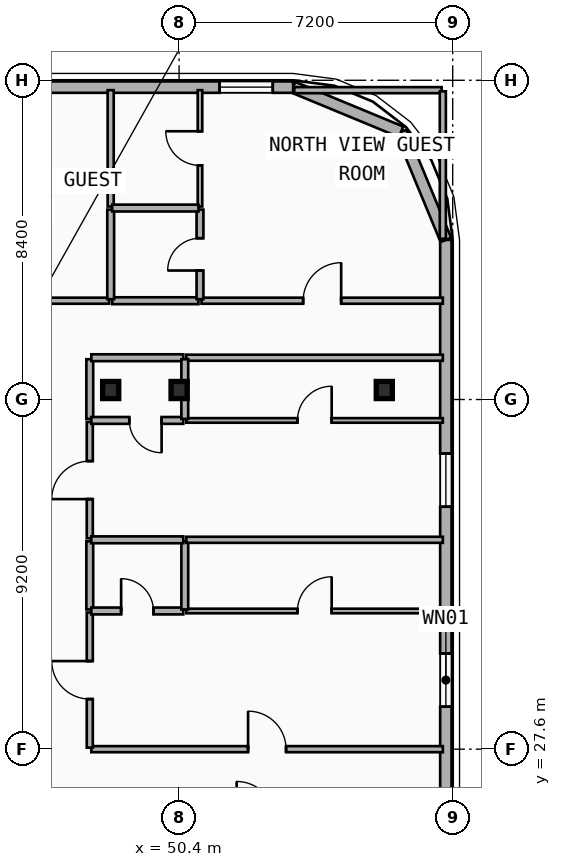
"""IFC4 building model, lengths in metres.
Left out: names, types, materials, properties, quantities, classifications, styles, units other than length and angle.
Written with IfcOpenShell. Run it as: python <this file> out.ifc"""

import sys

from ifc_helpers import new_model, si_unit, direction, frame, frame_2d, origin, origin_2d, place, context, subcontext, project, spatial, rectangle, i_section, extrude, element, fill, save


model = new_model("IFC4")
c1 = context("Model", 3, precision=1e-05, world=origin(), true_north=direction((0.0, 1.0)))
c2 = subcontext(c1, "Body", "Model", "MODEL_VIEW")
j1 = project(units=[si_unit("LENGTHUNIT", "METRE"), si_unit("PLANEANGLEUNIT", "RADIAN")], contexts=[c1])
p1 = place(None, origin())
s1 = spatial("IfcSite", under=j1, at=p1, CompositionType="ELEMENT")
p2 = place(p1, origin())
s2 = spatial("IfcBuilding", under=s1, at=p2, CompositionType="ELEMENT")
p3 = place(p2, frame((0.0, 0.0, 50.0)))
s3 = spatial("IfcBuildingStorey", under=s2, at=p3, CompositionType="ELEMENT", Elevation=50.0)
for number, where, z_axis, x_axis in (
    (1, (48.6, 37.05, 0.0), (0.0, 0.0, 1.0), (1.0, 0.0, 0.0)),
    (2, (50.4, 37.05, 0.0), (0.0, 0.0, 1.0), (1.0, 0.0, 0.0)),
    (3, (55.8, 37.05, 0.0), (0.0, 0.0, 1.0), (1.0, 0.0, 0.0)),
):
    element("IfcColumn", number, at=place(p3, frame(where, z_axis=z_axis, x_axis=x_axis)), inside=s3, PredefinedType="COLUMN", context=c2, shape_type="SweptSolid", body=[
        extrude(i_section(OverallWidth=0.424, OverallDepth=0.45, WebThickness=0.041, FlangeThickness=0.065, FilletRadius=0.015, at=origin_2d()), origin(), (0.0, 0.0, 1.0), 3.5),
    ])
p4 = place(p3, frame((57.42, 41.0, 0.0), z_axis=(0.0, 0.0, 1.0), x_axis=(0.0, -1.0, 0.0)))
e4 = element("IfcWall", 4, at=p4, inside=s3, PredefinedType="SOLIDWALL", context=c2, shape_type="SweptSolid", body=[
    extrude(rectangle(XDim=15.2, YDim=0.3, at=frame_2d((7.6, 0.0))), origin(), (0.0, 0.0, 1.0), 3.24),
])
p5 = place(p4, frame((10.882, 0.0, 0.48)))
e5 = element("IfcOpeningElement", 5, at=p5, cuts=e4, PredefinedType="OPENING", context=c2, shape_type="SweptSolid", body=[
    extrude(rectangle(XDim=1.4, YDim=1.8, at=frame_2d((0.7, 0.9))), frame((0.0, 0.16, 0.0), z_axis=(0.0, -1.0, 0.0), x_axis=(1.0, 0.0, 0.0)), (0.0, 0.0, 1.0), 0.32),
])
p6 = place(p4, frame((5.621, 0.0, 0.48)))
e6 = element("IfcOpeningElement", 6, at=p6, cuts=e4, PredefinedType="OPENING", context=c2, shape_type="SweptSolid", body=[
    extrude(rectangle(XDim=1.4, YDim=1.8, at=frame_2d((0.7, 0.9))), frame((0.0, 0.16, 0.0), z_axis=(0.0, -1.0, 0.0), x_axis=(1.0, 0.0, 0.0)), (0.0, 0.0, 1.0), 0.32),
])
p7 = place(p3, frame((56.243, 43.843, 0.0), z_axis=(0.0, 0.0, 1.0), x_axis=(0.382636798336, -0.92389884758, 0.0)))
e7 = element("IfcWall", 7, at=p7, inside=s3, PredefinedType="SOLIDWALL", context=c2, shape_type="SweptSolid", body=[
    extrude(rectangle(XDim=3.077, YDim=0.3, at=frame_2d((1.538, 0.0))), origin(), (0.0, 0.0, 1.0), 3.24),
])
p8 = place(p3, frame((53.4, 45.02, 0.0), z_axis=(0.0, 0.0, 1.0), x_axis=(0.923882414032, -0.382676475685, 0.0)))
e8 = element("IfcWall", 8, at=p8, inside=s3, PredefinedType="SOLIDWALL", context=c2, shape_type="SweptSolid", body=[
    extrude(rectangle(XDim=3.077, YDim=0.3, at=frame_2d((1.539, 0.0))), origin(), (0.0, 0.0, 1.0), 3.24),
])
p9 = place(p3, frame((4.2, 45.02, 0.0), z_axis=(0.0, 0.0, 1.0), x_axis=(1.0, 0.0, 0.0)))
e9 = element("IfcWall", 9, at=p9, inside=s3, PredefinedType="SOLIDWALL", context=c2, shape_type="SweptSolid", body=[
    extrude(rectangle(XDim=49.2, YDim=0.3, at=frame_2d((24.6, 0.0))), origin(), (0.0, 0.0, 1.0), 3.24),
])
p10 = place(p9, frame((8.99, 0.0, 0.85)))
e10 = element("IfcOpeningElement", 10, at=p10, cuts=e9, PredefinedType="OPENING", context=c2, shape_type="SweptSolid", body=[
    extrude(rectangle(XDim=1.4, YDim=1.8, at=frame_2d((0.7, 0.9))), frame((0.0, 0.16, 0.0), z_axis=(0.0, -1.0, 0.0), x_axis=(1.0, 0.0, 0.0)), (0.0, 0.0, 1.0), 0.32),
])
p11 = place(p9, frame((11.72, 0.0, 0.85)))
e11 = element("IfcOpeningElement", 11, at=p11, cuts=e9, PredefinedType="OPENING", context=c2, shape_type="SweptSolid", body=[
    extrude(rectangle(XDim=1.4, YDim=1.8, at=frame_2d((0.7, 0.9))), frame((0.0, 0.16, 0.0), z_axis=(0.0, -1.0, 0.0), x_axis=(1.0, 0.0, 0.0)), (0.0, 0.0, 1.0), 0.32),
])
p12 = place(p9, frame((19.499, 0.0, 0.85)))
e12 = element("IfcOpeningElement", 12, at=p12, cuts=e9, PredefinedType="OPENING", context=c2, shape_type="SweptSolid", body=[
    extrude(rectangle(XDim=1.4, YDim=1.8, at=frame_2d((0.7, 0.9))), frame((0.0, 0.16, 0.0), z_axis=(0.0, -1.0, 0.0), x_axis=(1.0, 0.0, 0.0)), (0.0, 0.0, 1.0), 0.32),
])
p13 = place(p9, frame((22.998, 0.0, 0.85)))
e13 = element("IfcOpeningElement", 13, at=p13, cuts=e9, PredefinedType="OPENING", context=c2, shape_type="SweptSolid", body=[
    extrude(rectangle(XDim=1.4, YDim=1.8, at=frame_2d((0.7, 0.9))), frame((0.0, 0.16, 0.0), z_axis=(0.0, -1.0, 0.0), x_axis=(1.0, 0.0, 0.0)), (0.0, 0.0, 1.0), 0.32),
])
p14 = place(p9, frame((34.965, 0.0, 0.85)))
e14 = element("IfcOpeningElement", 14, at=p14, cuts=e9, PredefinedType="OPENING", context=c2, shape_type="SweptSolid", body=[
    extrude(rectangle(XDim=1.4, YDim=1.8, at=frame_2d((0.7, 0.9))), frame((0.0, 0.16, 0.0), z_axis=(0.0, -1.0, 0.0), x_axis=(1.0, 0.0, 0.0)), (0.0, 0.0, 1.0), 0.32),
])
p15 = place(p9, frame((39.532, 0.0, 0.85)))
e15 = element("IfcOpeningElement", 15, at=p15, cuts=e9, PredefinedType="OPENING", context=c2, shape_type="SweptSolid", body=[
    extrude(rectangle(XDim=1.4, YDim=1.8, at=frame_2d((0.7, 0.9))), frame((0.0, 0.16, 0.0), z_axis=(0.0, -1.0, 0.0), x_axis=(1.0, 0.0, 0.0)), (0.0, 0.0, 1.0), 0.32),
])
p16 = place(p9, frame((47.265, 0.0, 0.85)))
e16 = element("IfcOpeningElement", 16, at=p16, cuts=e9, PredefinedType="OPENING", context=c2, shape_type="SweptSolid", body=[
    extrude(rectangle(XDim=1.4, YDim=1.8, at=frame_2d((0.7, 0.9))), frame((0.0, 0.16, 0.0), z_axis=(0.0, -1.0, 0.0), x_axis=(1.0, 0.0, 0.0)), (0.0, 0.0, 1.0), 0.32),
])
p17 = place(p3, frame((48.09, 27.6, 0.0), z_axis=(0.0, 0.0, 1.0), x_axis=(1.0, 0.0, 0.0)))
e17 = element("IfcWall", 17, at=p17, inside=s3, PredefinedType="PARTITIONING", context=c2, shape_type="SweptSolid", body=[
    extrude(rectangle(XDim=9.25, YDim=0.16, at=frame_2d((4.625, 0.0))), origin(), (0.0, 0.0, 1.0), 2.57),
])
p18 = place(p17, frame((4.125, 0.0, 0.0)))
e18 = element("IfcOpeningElement", 18, at=p18, cuts=e17, PredefinedType="OPENING", context=c2, shape_type="SweptSolid", body=[
    extrude(rectangle(XDim=1.0, YDim=2.15, at=frame_2d((0.5, 1.075))), frame((0.0, 0.09, 0.0), z_axis=(0.0, -1.0, 0.0), x_axis=(1.0, 0.0, 0.0)), (0.0, 0.0, 1.0), 0.18),
])
p19 = place(p3, frame((48.05, 27.64, 0.0), z_axis=(0.0, 0.0, 1.0), x_axis=(0.0, 1.0, 0.0)))
e19 = element("IfcWall", 19, at=p19, inside=s3, PredefinedType="PARTITIONING", context=c2, shape_type="SweptSolid", body=[
    extrude(rectangle(XDim=3.556, YDim=0.16, at=frame_2d((1.778, 0.0))), origin(), (0.0, 0.0, 1.0), 3.24),
])
p20 = place(p19, frame((1.278, 0.0, 0.0)))
e20 = element("IfcOpeningElement", 20, at=p20, cuts=e19, PredefinedType="OPENING", context=c2, shape_type="SweptSolid", body=[
    extrude(rectangle(XDim=1.0, YDim=2.15, at=frame_2d((0.5, 1.075))), frame((0.0, 0.09, 0.0), z_axis=(0.0, -1.0, 0.0), x_axis=(1.0, 0.0, 0.0)), (0.0, 0.0, 1.0), 0.18),
])
p21 = place(p3, frame((48.05, 31.276, 0.0), z_axis=(0.0, 0.0, 1.0), x_axis=(0.0, 1.0, 0.0)))
e21 = element("IfcWall", 21, at=p21, inside=s3, PredefinedType="PLUMBINGWALL", context=c2, shape_type="SweptSolid", body=[
    extrude(rectangle(XDim=1.793, YDim=0.18, at=frame_2d((0.896, 0.0))), origin(), (0.0, 0.0, 1.0), 3.24),
])
p22 = place(p3, frame((48.05, 33.149, 0.0), z_axis=(0.0, 0.0, 1.0), x_axis=(0.0, 1.0, 0.0)))
e22 = element("IfcWall", 22, at=p22, inside=s3, PredefinedType="PARTITIONING", context=c2, shape_type="SweptSolid", body=[
    extrude(rectangle(XDim=3.061, YDim=0.16, at=frame_2d((1.531, 0.0))), origin(), (0.0, 0.0, 1.0), 3.24),
])
p23 = place(p22, frame((1.031, 0.0, 0.0)))
e23 = element("IfcOpeningElement", 23, at=p23, cuts=e22, PredefinedType="OPENING", context=c2, shape_type="SweptSolid", body=[
    extrude(rectangle(XDim=1.0, YDim=2.15, at=frame_2d((0.5, 1.075))), frame((0.0, 0.09, 0.0), z_axis=(0.0, -1.0, 0.0), x_axis=(1.0, 0.0, 0.0)), (0.0, 0.0, 1.0), 0.18),
])
p24 = place(p3, frame((48.05, 36.29, 0.0), z_axis=(0.0, 0.0, 1.0), x_axis=(0.0, 1.0, 0.0)))
e24 = element("IfcWall", 24, at=p24, inside=s3, PredefinedType="PLUMBINGWALL", context=c2, shape_type="SweptSolid", body=[
    extrude(rectangle(XDim=1.57, YDim=0.18, at=frame_2d((0.785, 0.0))), origin(), (0.0, 0.0, 1.0), 2.72),
])
p25 = place(p3, frame((48.09, 37.9, 0.0), z_axis=(0.0, 0.0, 1.0), x_axis=(1.0, 0.0, 0.0)))
e25 = element("IfcWall", 25, at=p25, inside=s3, PredefinedType="PLUMBINGWALL", context=c2, shape_type="SweptSolid", body=[
    extrude(rectangle(XDim=2.42, YDim=0.18, at=frame_2d((1.21, 0.0))), origin(), (0.0, 0.0, 1.0), 3.24),
])
p26 = place(p3, frame((50.59, 37.9, 0.0), z_axis=(0.0, 0.0, 1.0), x_axis=(1.0, 0.0, 0.0)))
e26 = element("IfcWall", 26, at=p26, inside=s3, PredefinedType="PARTITIONING", context=c2, shape_type="SweptSolid", body=[
    extrude(rectangle(XDim=6.75, YDim=0.16, at=frame_2d((3.375, 0.0))), origin(), (0.0, 0.0, 1.0), 3.24),
])
p27 = place(p3, frame((35.737, 39.4, 0.0), z_axis=(0.0, 0.0, 1.0), x_axis=(1.0, 0.0, 0.0)))
e27 = element("IfcWall", 27, at=p27, inside=s3, PredefinedType="PARTITIONING", context=c2, shape_type="SweptSolid", body=[
    extrude(rectangle(XDim=12.823, YDim=0.16, at=frame_2d((6.412, 0.0))), origin(), (0.0, 0.0, 1.0), 3.24),
])
p28 = place(p27, frame((5.912, 0.0, 0.0)))
e28 = element("IfcOpeningElement", 28, at=p28, cuts=e27, PredefinedType="OPENING", context=c2, shape_type="SweptSolid", body=[
    extrude(rectangle(XDim=1.0, YDim=2.15, at=frame_2d((0.5, 1.075))), frame((0.0, 0.09, 0.0), z_axis=(0.0, -1.0, 0.0), x_axis=(1.0, 0.0, 0.0)), (0.0, 0.0, 1.0), 0.18),
])
p29 = place(p3, frame((50.99, 39.4, 0.0), z_axis=(0.0, 0.0, 1.0), x_axis=(1.0, 0.0, 0.0)))
e29 = element("IfcWall", 29, at=p29, inside=s3, PredefinedType="PARTITIONING", context=c2, shape_type="SweptSolid", body=[
    extrude(rectangle(XDim=6.35, YDim=0.16, at=frame_2d((3.175, 0.0))), origin(), (0.0, 0.0, 1.0), 3.24),
])
p30 = place(p29, frame((2.675, 0.0, 0.0)))
e30 = element("IfcOpeningElement", 30, at=p30, cuts=e29, PredefinedType="OPENING", context=c2, shape_type="SweptSolid", body=[
    extrude(rectangle(XDim=1.0, YDim=2.15, at=frame_2d((0.5, 1.075))), frame((0.0, 0.09, 0.0), z_axis=(0.0, -1.0, 0.0), x_axis=(1.0, 0.0, 0.0)), (0.0, 0.0, 1.0), 0.18),
])
p31 = place(p3, frame((48.64, 39.4, 0.0), z_axis=(0.0, 0.0, 1.0), x_axis=(1.0, 0.0, 0.0)))
e31 = element("IfcWall", 31, at=p31, inside=s3, PredefinedType="PLUMBINGWALL", context=c2, shape_type="SweptSolid", body=[
    extrude(rectangle(XDim=2.27, YDim=0.18, at=frame_2d((1.135, 0.0))), origin(), (0.0, 0.0, 1.0), 3.24),
])
p32 = place(p3, frame((48.09, 31.236, 0.0), z_axis=(0.0, 0.0, 1.0), x_axis=(1.0, 0.0, 0.0)))
e32 = element("IfcWall", 32, at=p32, inside=s3, PredefinedType="PLUMBINGWALL", context=c2, shape_type="SweptSolid", body=[
    extrude(rectangle(XDim=2.42, YDim=0.18, at=frame_2d((1.21, 0.0))), origin(), (0.0, 0.0, 1.0), 2.57),
])
p33 = place(p32, frame((0.785, 0.0, 0.0)))
e33 = element("IfcOpeningElement", 33, at=p33, cuts=e32, PredefinedType="OPENING", context=c2, shape_type="SweptSolid", body=[
    extrude(rectangle(XDim=0.85, YDim=2.1, at=frame_2d((0.425, 1.05))), frame((0.0, 0.1, 0.0), z_axis=(0.0, -1.0, 0.0), x_axis=(1.0, 0.0, 0.0)), (0.0, 0.0, 1.0), 0.2),
])
p34 = place(p3, frame((50.59, 31.236, 0.0), z_axis=(0.0, 0.0, 1.0), x_axis=(1.0, 0.0, 0.0)))
e34 = element("IfcWall", 34, at=p34, inside=s3, PredefinedType="PARTITIONING", context=c2, shape_type="SweptSolid", body=[
    extrude(rectangle(XDim=6.75, YDim=0.12, at=frame_2d((3.375, 0.0))), origin(), (0.0, 0.0, 1.0), 2.57),
])
p35 = place(p34, frame((2.925, 0.0, 0.0)))
e35 = element("IfcOpeningElement", 35, at=p35, cuts=e34, PredefinedType="OPENING", context=c2, shape_type="SweptSolid", body=[
    extrude(rectangle(XDim=0.9, YDim=2.1, at=frame_2d((0.45, 1.05))), frame((0.0, 0.07, 0.0), z_axis=(0.0, -1.0, 0.0), x_axis=(1.0, 0.0, 0.0)), (0.0, 0.0, 1.0), 0.14),
])
p36 = place(p3, frame((50.55, 31.276, 0.0), z_axis=(0.0, 0.0, 1.0), x_axis=(0.0, 1.0, 0.0)))
e36 = element("IfcWall", 36, at=p36, inside=s3, PredefinedType="PLUMBINGWALL", context=c2, shape_type="SweptSolid", body=[
    extrude(rectangle(XDim=1.793, YDim=0.18, at=frame_2d((0.896, 0.0))), origin(), (0.0, 0.0, 1.0), 2.57),
])
p37 = place(p3, frame((48.09, 33.109, 0.0), z_axis=(0.0, 0.0, 1.0), x_axis=(1.0, 0.0, 0.0)))
e37 = element("IfcWall", 37, at=p37, inside=s3, PredefinedType="PLUMBINGWALL", context=c2, shape_type="SweptSolid", body=[
    extrude(rectangle(XDim=2.42, YDim=0.18, at=frame_2d((1.21, 0.0))), origin(), (0.0, 0.0, 1.0), 2.57),
])
p38 = place(p3, frame((50.59, 33.109, 0.0), z_axis=(0.0, 0.0, 1.0), x_axis=(1.0, 0.0, 0.0)))
e38 = element("IfcWall", 38, at=p38, inside=s3, PredefinedType="PARTITIONING", context=c2, shape_type="SweptSolid", body=[
    extrude(rectangle(XDim=6.75, YDim=0.16, at=frame_2d((3.375, 0.0))), origin(), (0.0, 0.0, 1.0), 2.57),
])
p39 = place(p3, frame((50.51, 36.25, 0.0), z_axis=(0.0, 0.0, 1.0), x_axis=(-1.0, 0.0, 0.0)))
e39 = element("IfcWall", 39, at=p39, inside=s3, PredefinedType="PLUMBINGWALL", context=c2, shape_type="SweptSolid", body=[
    extrude(rectangle(XDim=2.42, YDim=0.18, at=frame_2d((1.21, 0.0))), origin(), (0.0, 0.0, 1.0), 2.57),
])
p40 = place(p39, frame((0.57, 0.0, 0.0)))
e40 = element("IfcOpeningElement", 40, at=p40, cuts=e39, PredefinedType="OPENING", context=c2, shape_type="SweptSolid", body=[
    extrude(rectangle(XDim=0.85, YDim=2.1, at=frame_2d((0.425, 1.05))), frame((0.0, 0.1, 0.0), z_axis=(0.0, -1.0, 0.0), x_axis=(1.0, 0.0, 0.0)), (0.0, 0.0, 1.0), 0.2),
])
p41 = place(p3, frame((50.59, 36.25, 0.0), z_axis=(0.0, 0.0, 1.0), x_axis=(1.0, 0.0, 0.0)))
e41 = element("IfcWall", 41, at=p41, inside=s3, PredefinedType="PARTITIONING", context=c2, shape_type="SweptSolid", body=[
    extrude(rectangle(XDim=6.75, YDim=0.12, at=frame_2d((3.375, 0.0))), origin(), (0.0, 0.0, 1.0), 2.57),
])
p42 = place(p41, frame((2.925, 0.0, 0.0)))
e42 = element("IfcOpeningElement", 42, at=p42, cuts=e41, PredefinedType="OPENING", context=c2, shape_type="SweptSolid", body=[
    extrude(rectangle(XDim=0.9, YDim=2.1, at=frame_2d((0.45, 1.05))), frame((0.0, 0.07, 0.0), z_axis=(0.0, -1.0, 0.0), x_axis=(1.0, 0.0, 0.0)), (0.0, 0.0, 1.0), 0.14),
])
p43 = place(p3, frame((50.55, 36.29, 0.0), z_axis=(0.0, 0.0, 1.0), x_axis=(0.0, 1.0, 0.0)))
e43 = element("IfcWall", 43, at=p43, inside=s3, PredefinedType="PLUMBINGWALL", context=c2, shape_type="SweptSolid", body=[
    extrude(rectangle(XDim=1.57, YDim=0.18, at=frame_2d((0.785, 0.0))), origin(), (0.0, 0.0, 1.0), 2.57),
])
p44 = place(p3, frame((48.6, 39.44, 0.0), z_axis=(0.0, 0.0, 1.0), x_axis=(0.0, 1.0, 0.0)))
e44 = element("IfcWall", 44, at=p44, inside=s3, PredefinedType="PLUMBINGWALL", context=c2, shape_type="SweptSolid", body=[
    extrude(rectangle(XDim=2.358, YDim=0.18, at=frame_2d((1.179, 0.0))), origin(), (0.0, 0.0, 1.0), 3.24),
])
p45 = place(p3, frame((48.6, 41.878, 0.0), z_axis=(0.0, 0.0, 1.0), x_axis=(0.0, 1.0, 0.0)))
e45 = element("IfcWall", 45, at=p45, inside=s3, PredefinedType="PARTITIONING", context=c2, shape_type="SweptSolid", body=[
    extrude(rectangle(XDim=3.062, YDim=0.16, at=frame_2d((1.531, 0.0))), origin(), (0.0, 0.0, 1.0), 3.24),
])
p46 = place(p3, frame((50.95, 39.44, 0.0), z_axis=(0.0, 0.0, 1.0), x_axis=(0.0, 1.0, 0.0)))
e46 = element("IfcWall", 46, at=p46, inside=s3, PredefinedType="PLUMBINGWALL", context=c2, shape_type="SweptSolid", body=[
    extrude(rectangle(XDim=2.358, YDim=0.18, at=frame_2d((1.179, 0.0))), origin(), (0.0, 0.0, 1.0), 3.24),
])
p47 = place(p46, frame((0.754, 0.0, 0.0)))
e47 = element("IfcOpeningElement", 47, at=p47, cuts=e46, PredefinedType="OPENING", context=c2, shape_type="SweptSolid", body=[
    extrude(rectangle(XDim=0.85, YDim=2.1, at=frame_2d((0.425, 1.05))), frame((0.0, 0.1, 0.0), z_axis=(0.0, -1.0, 0.0), x_axis=(1.0, 0.0, 0.0)), (0.0, 0.0, 1.0), 0.2),
])
p48 = place(p3, frame((50.95, 41.878, 0.0), z_axis=(0.0, 0.0, 1.0), x_axis=(0.0, 1.0, 0.0)))
e48 = element("IfcWall", 48, at=p48, inside=s3, PredefinedType="PARTITIONING", context=c2, shape_type="SweptSolid", body=[
    extrude(rectangle(XDim=3.062, YDim=0.12, at=frame_2d((1.531, 0.0))), origin(), (0.0, 0.0, 1.0), 3.24),
])
p49 = place(p48, frame((1.081, 0.0, 0.0)))
e49 = element("IfcOpeningElement", 49, at=p49, cuts=e48, PredefinedType="OPENING", context=c2, shape_type="SweptSolid", body=[
    extrude(rectangle(XDim=0.9, YDim=2.1, at=frame_2d((0.45, 1.05))), frame((0.0, 0.07, 0.0), z_axis=(0.0, -1.0, 0.0), x_axis=(1.0, 0.0, 0.0)), (0.0, 0.0, 1.0), 0.14),
])
p50 = place(p3, frame((48.64, 41.838, 0.0), z_axis=(0.0, 0.0, 1.0), x_axis=(1.0, 0.0, 0.0)))
e50 = element("IfcWall", 50, at=p50, inside=s3, PredefinedType="PLUMBINGWALL", context=c2, shape_type="SweptSolid", body=[
    extrude(rectangle(XDim=2.27, YDim=0.18, at=frame_2d((1.135, 0.0))), origin(), (0.0, 0.0, 1.0), 3.24),
])
p51 = place(p3, frame((53.43, 44.94, 0.0), z_axis=(0.0, 0.0, 1.0), x_axis=(1.0, 0.0, 0.0)))
e51 = element("IfcWall", 51, at=p51, inside=s3, PredefinedType="PARTITIONING", context=c2, shape_type="SweptSolid", body=[
    extrude(rectangle(XDim=3.88, YDim=0.16, at=frame_2d((1.94, 0.0))), origin(), (0.0, 0.0, 1.0), 3.24),
])
p52 = place(p3, frame((57.34, 41.03, 0.0), z_axis=(0.0, 0.0, 1.0), x_axis=(0.0, 1.0, 0.0)))
e52 = element("IfcWall", 52, at=p52, inside=s3, PredefinedType="PARTITIONING", context=c2, shape_type="SweptSolid", body=[
    extrude(rectangle(XDim=3.88, YDim=0.16, at=frame_2d((1.94, 0.0))), origin(), (0.0, 0.0, 1.0), 3.24),
])
p53 = place(p5, origin())
e53 = element("IfcWindow", 53, at=p53, inside=s3, PartitioningType="SINGLE_PANEL", PredefinedType="WINDOW", context=c2, shape_type="SweptSolid", body=[
    extrude(rectangle(XDim=1.4, YDim=1.8, at=frame_2d((0.7, 0.9))), frame((0.0, 0.03, 0.0), z_axis=(0.0, -1.0, 0.0), x_axis=(1.0, 0.0, 0.0)), (0.0, 0.0, 1.0), 0.06),
])
fill(e5, e53)
p54 = place(p6, origin())
e54 = element("IfcWindow", 54, at=p54, inside=s3, PartitioningType="SINGLE_PANEL", PredefinedType="WINDOW", context=c2, shape_type="SweptSolid", body=[
    extrude(rectangle(XDim=1.4, YDim=1.8, at=frame_2d((0.7, 0.9))), frame((0.0, 0.03, 0.0), z_axis=(0.0, -1.0, 0.0), x_axis=(1.0, 0.0, 0.0)), (0.0, 0.0, 1.0), 0.06),
])
fill(e6, e54)
p55 = place(p16, origin())
e55 = element("IfcWindow", 55, at=p55, inside=s3, PartitioningType="SINGLE_PANEL", PredefinedType="WINDOW", context=c2, shape_type="SweptSolid", body=[
    extrude(rectangle(XDim=1.4, YDim=1.8, at=frame_2d((0.7, 0.9))), frame((0.0, 0.03, 0.0), z_axis=(0.0, -1.0, 0.0), x_axis=(1.0, 0.0, 0.0)), (0.0, 0.0, 1.0), 0.06),
])
fill(e16, e55)
p56 = place(p18, origin())
e56 = element("IfcDoor", 56, at=p56, inside=s3, OperationType="SINGLE_SWING_LEFT", PredefinedType="DOOR", context=c2, shape_type="SweptSolid", body=[
    extrude(rectangle(XDim=1.0, YDim=2.15, at=frame_2d((0.5, 1.075))), frame((0.0, 0.025, 0.0), z_axis=(0.0, -1.0, 0.0), x_axis=(1.0, 0.0, 0.0)), (0.0, 0.0, 1.0), 0.05),
])
fill(e18, e56)
p57 = place(p20, origin())
e57 = element("IfcDoor", 57, at=p57, inside=s3, OperationType="SINGLE_SWING_RIGHT", PredefinedType="DOOR", context=c2, shape_type="SweptSolid", body=[
    extrude(rectangle(XDim=1.0, YDim=2.15, at=frame_2d((0.5, 1.075))), frame((0.0, 0.025, 0.0), z_axis=(0.0, -1.0, 0.0), x_axis=(1.0, 0.0, 0.0)), (0.0, 0.0, 1.0), 0.05),
])
fill(e20, e57)
p58 = place(p23, origin())
e58 = element("IfcDoor", 58, at=p58, inside=s3, OperationType="SINGLE_SWING_LEFT", PredefinedType="DOOR", context=c2, shape_type="SweptSolid", body=[
    extrude(rectangle(XDim=1.0, YDim=2.15, at=frame_2d((0.5, 1.075))), frame((0.0, 0.025, 0.0), z_axis=(0.0, -1.0, 0.0), x_axis=(1.0, 0.0, 0.0)), (0.0, 0.0, 1.0), 0.05),
])
fill(e23, e58)
p59 = place(p30, origin())
e59 = element("IfcDoor", 59, at=p59, inside=s3, OperationType="SINGLE_SWING_RIGHT", PredefinedType="DOOR", context=c2, shape_type="SweptSolid", body=[
    extrude(rectangle(XDim=1.0, YDim=2.15, at=frame_2d((0.5, 1.075))), frame((0.0, 0.025, 0.0), z_axis=(0.0, -1.0, 0.0), x_axis=(1.0, 0.0, 0.0)), (0.0, 0.0, 1.0), 0.05),
])
fill(e30, e59)
p60 = place(p33, origin())
e60 = element("IfcDoor", 60, at=p60, inside=s3, OperationType="SINGLE_SWING_LEFT", PredefinedType="DOOR", context=c2, shape_type="SweptSolid", body=[
    extrude(rectangle(XDim=0.85, YDim=2.1, at=frame_2d((0.425, 1.05))), frame((0.0, 0.025, 0.0), z_axis=(0.0, -1.0, 0.0), x_axis=(1.0, 0.0, 0.0)), (0.0, 0.0, 1.0), 0.05),
])
fill(e33, e60)
p61 = place(p35, origin())
e61 = element("IfcDoor", 61, at=p61, inside=s3, OperationType="SINGLE_SWING_RIGHT", PredefinedType="DOOR", context=c2, shape_type="SweptSolid", body=[
    extrude(rectangle(XDim=0.9, YDim=2.1, at=frame_2d((0.45, 1.05))), frame((0.0, 0.025, 0.0), z_axis=(0.0, -1.0, 0.0), x_axis=(1.0, 0.0, 0.0)), (0.0, 0.0, 1.0), 0.05),
])
fill(e35, e61)
p62 = place(p40, origin())
e62 = element("IfcDoor", 62, at=p62, inside=s3, OperationType="SINGLE_SWING_LEFT", PredefinedType="DOOR", context=c2, shape_type="SweptSolid", body=[
    extrude(rectangle(XDim=0.85, YDim=2.1, at=frame_2d((0.425, 1.05))), frame((0.0, 0.025, 0.0), z_axis=(0.0, -1.0, 0.0), x_axis=(1.0, 0.0, 0.0)), (0.0, 0.0, 1.0), 0.05),
])
fill(e40, e62)
p63 = place(p42, origin())
e63 = element("IfcDoor", 63, at=p63, inside=s3, OperationType="SINGLE_SWING_RIGHT", PredefinedType="DOOR", context=c2, shape_type="SweptSolid", body=[
    extrude(rectangle(XDim=0.9, YDim=2.1, at=frame_2d((0.45, 1.05))), frame((0.0, 0.025, 0.0), z_axis=(0.0, -1.0, 0.0), x_axis=(1.0, 0.0, 0.0)), (0.0, 0.0, 1.0), 0.05),
])
fill(e42, e63)
p64 = place(p47, origin())
e64 = element("IfcDoor", 64, at=p64, inside=s3, OperationType="SINGLE_SWING_LEFT", PredefinedType="DOOR", context=c2, shape_type="SweptSolid", body=[
    extrude(rectangle(XDim=0.85, YDim=2.1, at=frame_2d((0.425, 1.05))), frame((0.0, 0.025, 0.0), z_axis=(0.0, -1.0, 0.0), x_axis=(1.0, 0.0, 0.0)), (0.0, 0.0, 1.0), 0.05),
])
fill(e47, e64)
p65 = place(p49, origin())
e65 = element("IfcDoor", 65, at=p65, inside=s3, OperationType="SINGLE_SWING_RIGHT", PredefinedType="DOOR", context=c2, shape_type="SweptSolid", body=[
    extrude(rectangle(XDim=0.9, YDim=2.1, at=frame_2d((0.45, 1.05))), frame((0.0, 0.025, 0.0), z_axis=(0.0, -1.0, 0.0), x_axis=(1.0, 0.0, 0.0)), (0.0, 0.0, 1.0), 0.05),
])
fill(e49, e65)
save(model, sys.argv[1])
